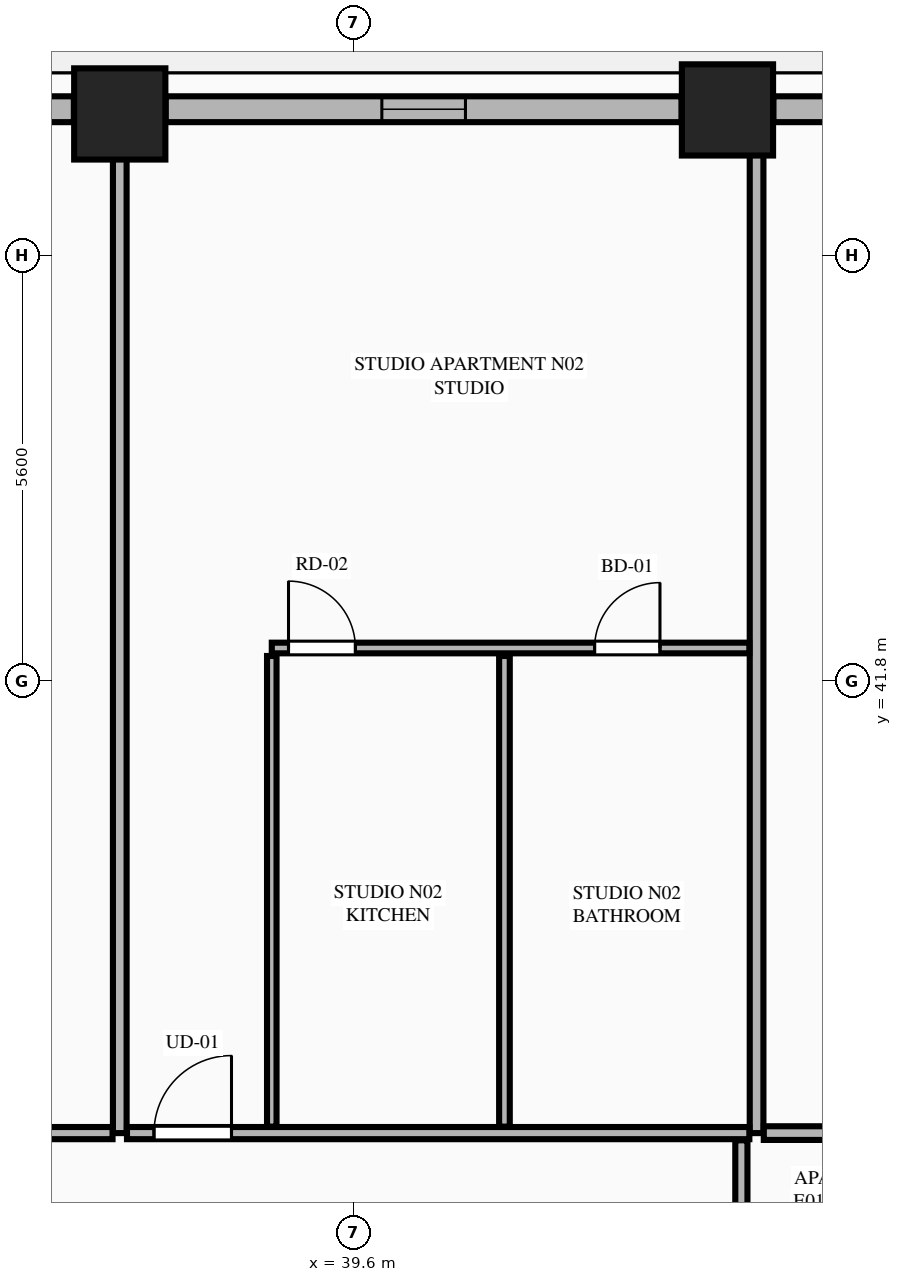
"""IFC4 building model, lengths in metres.
Left out: names, types, materials, properties, quantities, classifications, styles, units other than length and angle.
Written with IfcOpenShell. Run it as: python <this file> out.ifc"""

import sys

from ifc_helpers import new_model, si_unit, direction, frame, frame_2d, origin, origin_2d, place, context, subcontext, project, spatial, rectangle, extrude, element, fill, save


model = new_model("IFC4")
c1 = context("Model", 3, precision=1e-05, world=origin(), true_north=direction((0.0, 1.0)))
c2 = subcontext(c1, "Body", "Model", "MODEL_VIEW")
j1 = project(units=[si_unit("LENGTHUNIT", "METRE"), si_unit("PLANEANGLEUNIT", "RADIAN")], contexts=[c1])
p1 = place(None, origin())
s1 = spatial("IfcSite", under=j1, at=p1, CompositionType="ELEMENT")
p2 = place(p1, origin())
s2 = spatial("IfcBuilding", under=s1, at=p2, CompositionType="ELEMENT")
p3 = place(p2, frame((0.0, 0.0, 28.45)))
s3 = spatial("IfcBuildingStorey", under=s2, at=p3, CompositionType="ELEMENT", Elevation=28.45)
for number, where, z_axis, x_axis in (
    (1, (44.517, 49.311, 0.0), (0.0, 0.0, 1.0), (1.0, 0.0, 0.0)),
    (2, (36.522, 49.258, 0.0), (0.0, 0.0, 1.0), (1.0, 0.0, 0.0)),
):
    element("IfcColumn", number, at=place(p3, frame(where, z_axis=z_axis, x_axis=x_axis)), inside=s3, PredefinedType="COLUMN", context=c2, shape_type="SweptSolid", body=[
        extrude(rectangle(XDim=1.2, YDim=1.2, at=origin_2d()), origin(), (0.0, 0.0, 1.0), 3.55),
    ])
p4 = place(p3, frame((46.366, 49.32, 0.0), z_axis=(0.0, 0.0, 1.0), x_axis=(-1.0, 0.0, 0.0)))
e3 = element("IfcWall", 3, at=p4, inside=s3, PredefinedType="STANDARD", context=c2, shape_type="SweptSolid", body=[
    extrude(rectangle(XDim=1.245, YDim=0.34, at=frame_2d((0.623, 0.0))), origin(), (0.0, 0.0, 1.0), 3.33),
])
p5 = place(p3, frame((43.913, 49.32, 0.0), z_axis=(0.0, 0.0, 1.0), x_axis=(-1.0, 0.0, 0.0)))
e4 = element("IfcWall", 4, at=p5, inside=s3, PredefinedType="STANDARD", context=c2, shape_type="SweptSolid", body=[
    extrude(rectangle(XDim=6.787, YDim=0.34, at=frame_2d((3.394, 0.0))), origin(), (0.0, 0.0, 1.0), 2.787),
])
p6 = place(p5, frame((2.843, 0.0, 0.75)))
e5 = element("IfcOpeningElement", 5, at=p6, cuts=e4, PredefinedType="OPENING", context=c2, shape_type="SweptSolid", body=[
    extrude(rectangle(XDim=1.1, YDim=1.887, at=frame_2d((0.55, 0.943))), frame((0.0, 0.18, 0.0), z_axis=(0.0, -1.0, 0.0), x_axis=(1.0, 0.0, 0.0)), (0.0, 0.0, 1.0), 0.36),
])
p7 = place(p3, frame((35.918, 49.32, 0.0), z_axis=(0.0, 0.0, 1.0), x_axis=(-1.0, 0.0, 0.0)))
e6 = element("IfcWall", 6, at=p7, inside=s3, PredefinedType="STANDARD", context=c2, shape_type="SweptSolid", body=[
    extrude(rectangle(XDim=7.036, YDim=0.34, at=frame_2d((3.518, 0.0))), origin(), (0.0, 0.0, 1.0), 2.787),
])
p8 = place(p7, frame((2.968, 0.0, 0.0)))
e7 = element("IfcOpeningElement", 7, at=p8, cuts=e6, PredefinedType="OPENING", context=c2, shape_type="SweptSolid", body=[
    extrude(rectangle(XDim=1.1, YDim=2.25, at=frame_2d((0.55, 1.125))), frame((0.0, 0.18, 0.0), z_axis=(0.0, -1.0, 0.0), x_axis=(1.0, 0.0, 0.0)), (0.0, 0.0, 1.0), 0.36),
])
p9 = place(p3, frame((36.522, 35.85, 0.0), z_axis=(0.0, 0.0, 1.0), x_axis=(0.0, 1.0, 0.0)))
e8 = element("IfcWall", 8, at=p9, inside=s3, PredefinedType="PARTITIONING", context=c2, shape_type="SweptSolid", body=[
    extrude(rectangle(XDim=13.295, YDim=0.18, at=frame_2d((6.647, 0.0))), origin(), (0.0, 0.0, 1.0), 2.7),
])
p10 = place(p3, frame((44.9, 35.85, 0.0), z_axis=(0.0, 0.0, 1.0), x_axis=(0.0, 1.0, 0.0)))
e9 = element("IfcWall", 9, at=p10, inside=s3, PredefinedType="PARTITIONING", context=c2, shape_type="SweptSolid", body=[
    extrude(rectangle(XDim=13.295, YDim=0.18, at=frame_2d((6.647, 0.0))), origin(), (0.0, 0.0, 1.0), 3.33),
])
p11 = place(p3, frame((19.995, 35.85, 0.0), z_axis=(0.0, 0.0, 1.0), x_axis=(1.0, 0.0, 0.0)))
e10 = element("IfcWall", 10, at=p11, inside=s3, PredefinedType="PARTITIONING", context=c2, shape_type="SweptSolid", body=[
    extrude(rectangle(XDim=16.432, YDim=0.16, at=frame_2d((8.216, 0.0))), origin(), (0.0, 0.0, 1.0), 3.33),
])
p12 = place(p11, frame((14.577, 0.0, 0.0)))
e11 = element("IfcOpeningElement", 11, at=p12, cuts=e10, PredefinedType="OPENING", context=c2, shape_type="SweptSolid", body=[
    extrude(rectangle(XDim=1.02, YDim=2.25, at=frame_2d((0.51, 1.125))), frame((0.0, 0.09, 0.0), z_axis=(0.0, -1.0, 0.0), x_axis=(1.0, 0.0, 0.0)), (0.0, 0.0, 1.0), 0.18),
])
p13 = place(p3, frame((36.617, 35.85, 0.0), z_axis=(0.0, 0.0, 1.0), x_axis=(1.0, 0.0, 0.0)))
e12 = element("IfcWall", 12, at=p13, inside=s3, PredefinedType="PARTITIONING", context=c2, shape_type="SweptSolid", body=[
    extrude(rectangle(XDim=8.188, YDim=0.16, at=frame_2d((4.094, 0.0))), origin(), (0.0, 0.0, 1.0), 3.33),
])
p14 = place(p13, frame((0.355, 0.0, 0.0)))
e13 = element("IfcOpeningElement", 13, at=p14, cuts=e12, PredefinedType="OPENING", context=c2, shape_type="SweptSolid", body=[
    extrude(rectangle(XDim=1.02, YDim=2.25, at=frame_2d((0.51, 1.125))), frame((0.0, 0.09, 0.0), z_axis=(0.0, -1.0, 0.0), x_axis=(1.0, 0.0, 0.0)), (0.0, 0.0, 1.0), 0.18),
])
p15 = place(p3, frame((38.522, 35.935, 0.0), z_axis=(0.0, 0.0, 1.0), x_axis=(0.0, 1.0, 0.0)))
e14 = element("IfcWall", 14, at=p15, inside=s3, PredefinedType="PARTITIONING", context=c2, shape_type="SweptSolid", body=[
    extrude(rectangle(XDim=6.192, YDim=0.125, at=frame_2d((3.096, 0.0))), origin(), (0.0, 0.0, 1.0), 3.33),
])
p16 = place(p3, frame((38.522, 42.232, 0.0), z_axis=(0.0, 0.0, 1.0), x_axis=(1.0, 0.0, 0.0)))
e15 = element("IfcWall", 15, at=p16, inside=s3, PredefinedType="PLUMBINGWALL", context=c2, shape_type="SweptSolid", body=[
    extrude(rectangle(XDim=6.283, YDim=0.14, at=frame_2d((3.142, 0.0))), origin(), (0.0, 0.0, 1.0), 3.33),
])
p17 = place(p16, frame((4.247, 0.0, 0.0)))
e16 = element("IfcOpeningElement", 16, at=p17, cuts=e15, PredefinedType="OPENING", context=c2, shape_type="SweptSolid", body=[
    extrude(rectangle(XDim=0.86, YDim=2.1, at=frame_2d((0.43, 1.05))), frame((0.0, 0.08, 0.0), z_axis=(0.0, -1.0, 0.0), x_axis=(1.0, 0.0, 0.0)), (0.0, 0.0, 1.0), 0.16),
])
p18 = place(p16, frame((0.22, 0.0, 0.0)))
e17 = element("IfcOpeningElement", 17, at=p18, cuts=e15, PredefinedType="OPENING", context=c2, shape_type="SweptSolid", body=[
    extrude(rectangle(XDim=0.88, YDim=2.15, at=frame_2d((0.44, 1.075))), frame((0.0, 0.08, 0.0), z_axis=(0.0, -1.0, 0.0), x_axis=(1.0, 0.0, 0.0)), (0.0, 0.0, 1.0), 0.16),
])
p19 = place(p3, frame((41.583, 35.935, 0.0), z_axis=(0.0, 0.0, 1.0), x_axis=(0.0, 1.0, 0.0)))
e18 = element("IfcWall", 18, at=p19, inside=s3, PredefinedType="PLUMBINGWALL", context=c2, shape_type="SweptSolid", body=[
    extrude(rectangle(XDim=6.192, YDim=0.14, at=frame_2d((3.096, 0.0))), origin(), (0.0, 0.0, 1.0), 3.33),
])
p20 = place(p3, frame((44.995, 35.85, 0.0), z_axis=(0.0, 0.0, 1.0), x_axis=(1.0, 0.0, 0.0)))
e19 = element("IfcWall", 19, at=p20, inside=s3, PredefinedType="PARTITIONING", context=c2, shape_type="SweptSolid", body=[
    extrude(rectangle(XDim=9.14, YDim=0.18, at=frame_2d((4.57, 0.0))), origin(), (0.0, 0.0, 1.0), 3.33),
])
p21 = place(p3, frame((44.7, 16.045, 0.0), z_axis=(0.0, 0.0, 1.0), x_axis=(0.0, 1.0, 0.0)))
e20 = element("IfcWall", 20, at=p21, inside=s3, PredefinedType="PARTITIONING", context=c2, shape_type="SweptSolid", body=[
    extrude(rectangle(XDim=19.71, YDim=0.16, at=frame_2d((9.855, 0.0))), origin(), (0.0, 0.0, 1.0), 2.7),
])
p22 = place(p21, frame((0.45, 0.0, 0.0)))
e21 = element("IfcOpeningElement", 21, at=p22, cuts=e20, PredefinedType="OPENING", context=c2, shape_type="SweptSolid", body=[
    extrude(rectangle(XDim=1.02, YDim=2.25, at=frame_2d((0.51, 1.125))), frame((0.0, 0.09, 0.0), z_axis=(0.0, -1.0, 0.0), x_axis=(1.0, 0.0, 0.0)), (0.0, 0.0, 1.0), 0.18),
])
p23 = place(p6, origin())
e22 = element("IfcWindow", 22, at=p23, inside=s3, PartitioningType="SINGLE_PANEL", PredefinedType="WINDOW", context=c2, shape_type="SweptSolid", body=[
    extrude(rectangle(XDim=1.1, YDim=1.887, at=frame_2d((0.55, 0.943))), frame((0.0, 0.03, 0.0), z_axis=(0.0, -1.0, 0.0), x_axis=(1.0, 0.0, 0.0)), (0.0, 0.0, 1.0), 0.06),
])
fill(e5, e22)
p24 = place(p17, origin())
e23 = element("IfcDoor", 23, at=p24, inside=s3, OperationType="SINGLE_SWING_RIGHT", PredefinedType="DOOR", context=c2, shape_type="SweptSolid", body=[
    extrude(rectangle(XDim=0.86, YDim=2.1, at=frame_2d((0.43, 1.05))), frame((0.0, 0.025, 0.0), z_axis=(0.0, -1.0, 0.0), x_axis=(1.0, 0.0, 0.0)), (0.0, 0.0, 1.0), 0.05),
])
fill(e16, e23)
p25 = place(p14, origin())
e24 = element("IfcDoor", 24, at=p25, inside=s3, OperationType="SINGLE_SWING_RIGHT", PredefinedType="DOOR", context=c2, shape_type="SweptSolid", body=[
    extrude(rectangle(XDim=1.02, YDim=2.25, at=frame_2d((0.51, 1.125))), frame((0.0, 0.025, 0.0), z_axis=(0.0, -1.0, 0.0), x_axis=(1.0, 0.0, 0.0)), (0.0, 0.0, 1.0), 0.05),
])
fill(e13, e24)
p26 = place(p18, origin())
e25 = element("IfcDoor", 25, at=p26, inside=s3, OperationType="SINGLE_SWING_LEFT", PredefinedType="DOOR", context=c2, shape_type="SweptSolid", body=[
    extrude(rectangle(XDim=0.88, YDim=2.15, at=frame_2d((0.44, 1.075))), frame((0.0, 0.025, 0.0), z_axis=(0.0, -1.0, 0.0), x_axis=(1.0, 0.0, 0.0)), (0.0, 0.0, 1.0), 0.05),
])
fill(e17, e25)
save(model, sys.argv[1])
